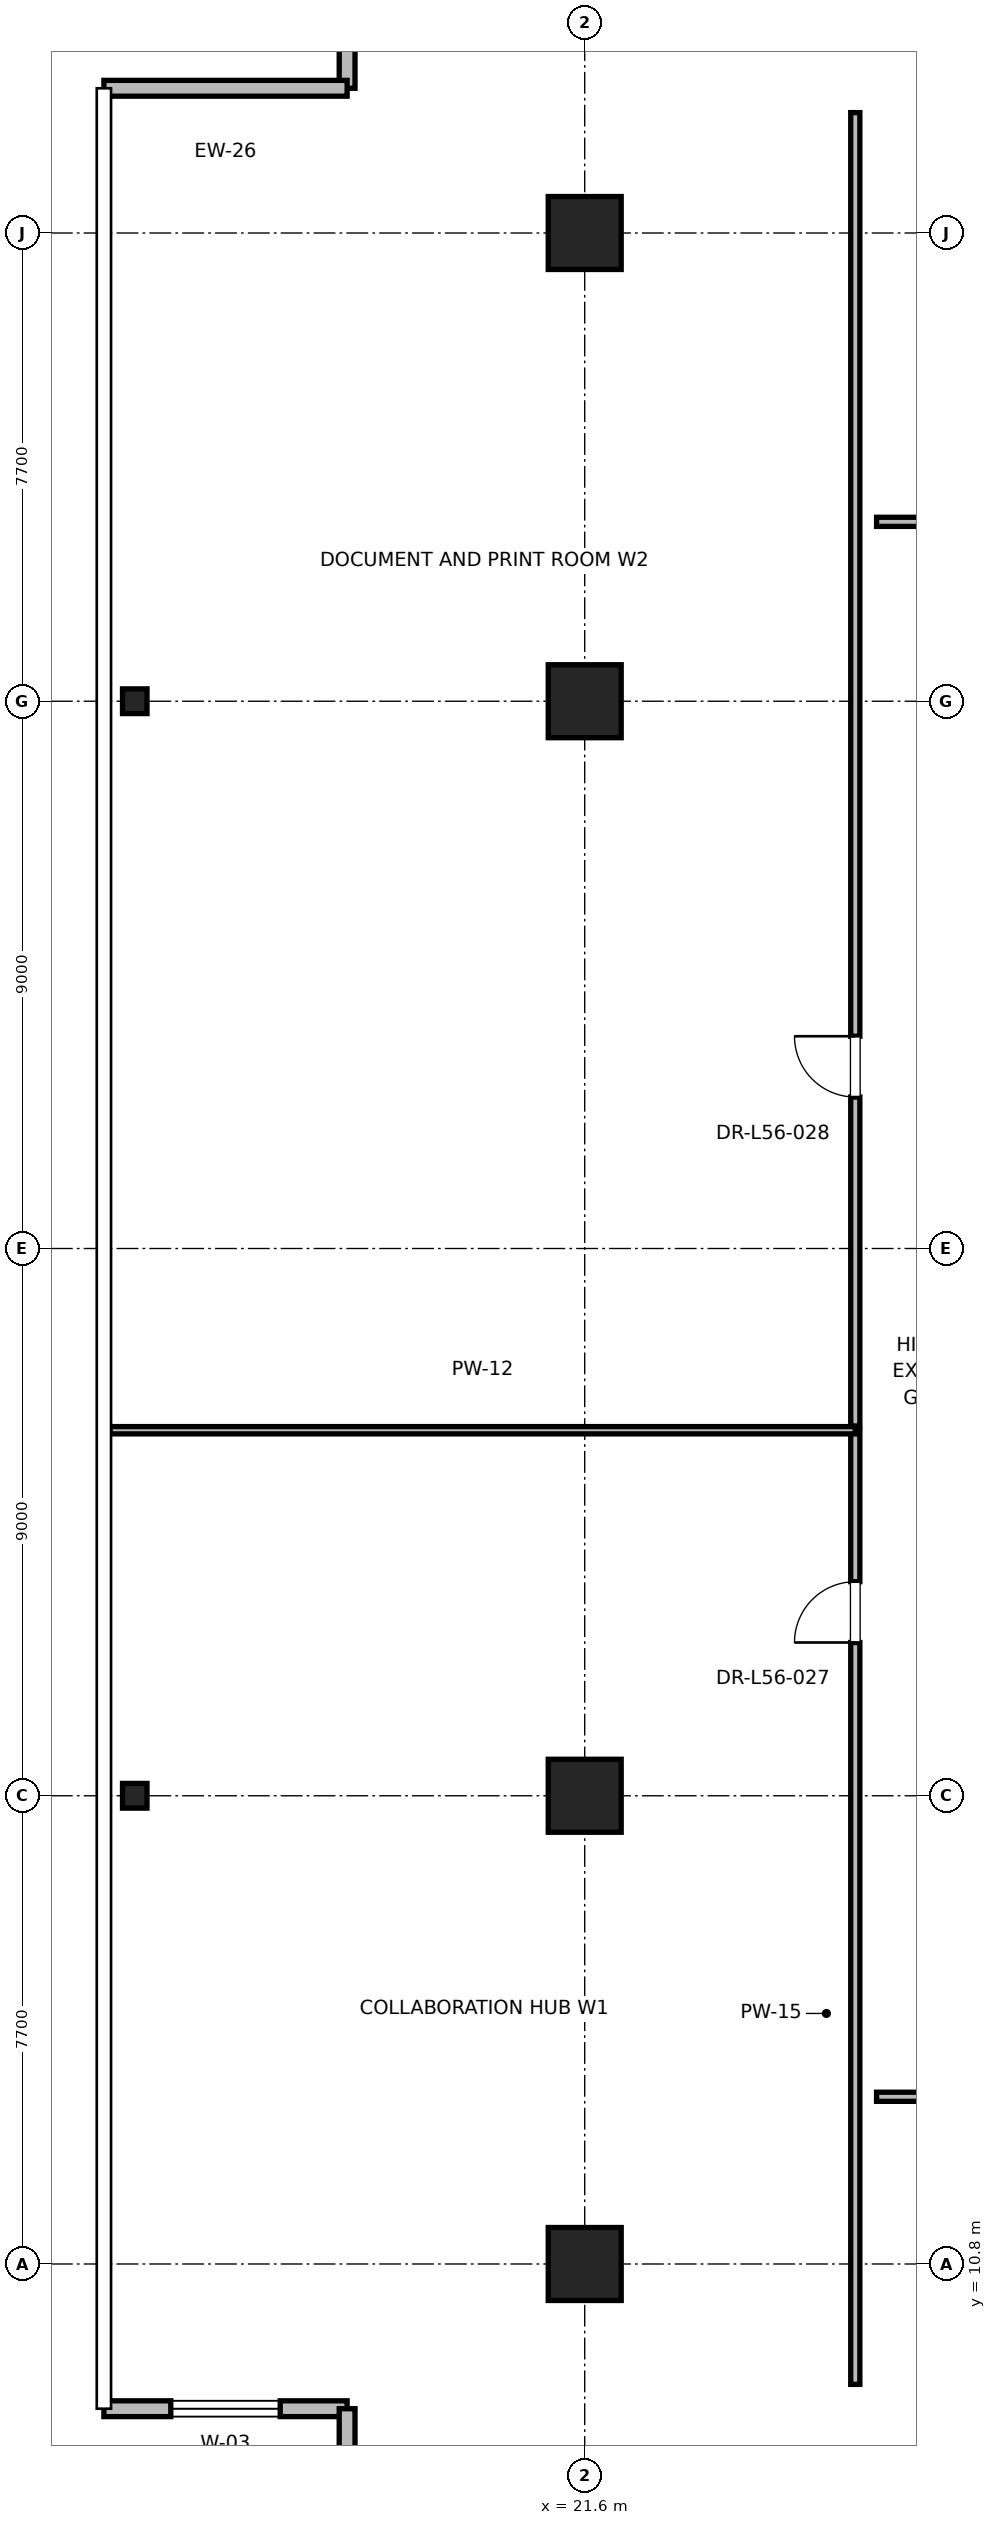
"""IFC4 building model, lengths in metres.
Left out: names, types, materials, properties, quantities, classifications, styles, units other than length and angle.
Written with IfcOpenShell. Run it as: python <this file> out.ifc"""

import sys

from ifc_helpers import new_model, si_unit, direction, frame, frame_2d, origin, origin_2d, place, context, subcontext, project, spatial, rectangle, i_section, extrude, element, fill, save


model = new_model("IFC4")
c1 = context("Model", 3, precision=1e-05, world=origin(), true_north=direction((0.0, 1.0)))
c2 = subcontext(c1, "Body", "Model", "MODEL_VIEW")
j1 = project(units=[si_unit("LENGTHUNIT", "METRE"), si_unit("PLANEANGLEUNIT", "RADIAN")], contexts=[c1])
p1 = place(None, origin())
s1 = spatial("IfcSite", under=j1, at=p1, CompositionType="ELEMENT")
p2 = place(p1, origin())
s2 = spatial("IfcBuilding", under=s1, at=p2, CompositionType="ELEMENT")
p3 = place(p2, frame((0.0, 0.0, 243.2)))
s3 = spatial("IfcBuildingStorey", under=s2, at=p3, CompositionType="ELEMENT", Elevation=243.2)
for number, where, z_axis, x_axis in (
    (1, (21.6, 18.5, 0.0), (0.0, 0.0, 1.0), (1.0, 0.0, 0.0)),
    (2, (21.6, 36.5, 0.0), (0.0, 0.0, 1.0), (1.0, 0.0, 0.0)),
    (3, (21.6, 10.8, 0.0), (0.0, 0.0, 1.0), (1.0, 0.0, 0.0)),
    (4, (21.6, 44.2, 0.0), (0.0, 0.0, 1.0), (1.0, 0.0, 0.0)),
):
    element("IfcColumn", number, at=place(p3, frame(where, z_axis=z_axis, x_axis=x_axis)), inside=s3, PredefinedType="COLUMN", context=c2, shape_type="SweptSolid", body=[
        extrude(rectangle(XDim=1.2, YDim=1.2, at=origin_2d()), origin(), (0.0, 0.0, 1.0), 4.0),
    ])
for number, where, z_axis, x_axis in (
    (5, (14.2, 18.5, 0.0), (0.0, 0.0, 1.0), (1.0, 0.0, 0.0)),
    (6, (14.2, 36.5, 0.0), (0.0, 0.0, 1.0), (1.0, 0.0, 0.0)),
):
    element("IfcColumn", number, at=place(p3, frame(where, z_axis=z_axis, x_axis=x_axis)), inside=s3, PredefinedType="COLUMN", context=c2, shape_type="SweptSolid", body=[
        extrude(i_section(OverallWidth=0.403, OverallDepth=0.406, WebThickness=0.027, FlangeThickness=0.043, FilletRadius=0.015, at=origin_2d()), origin(), (0.0, 0.0, 1.0), 4.0),
    ])
p4 = place(p3, frame((13.692, 8.42, 0.0), z_axis=(0.0, 0.0, 1.0), x_axis=(1.0, 0.0, 0.0)))
e7 = element("IfcWall", 7, at=p4, inside=s3, PredefinedType="PARAPET", context=c2, shape_type="SweptSolid", body=[
    extrude(rectangle(XDim=4.0, YDim=0.26, at=frame_2d((2.0, 0.0))), origin(), (0.0, 0.0, 1.0), 3.785),
])
p5 = place(p4, frame((1.1, 0.0, 0.85)))
e8 = element("IfcOpeningElement", 8, at=p5, cuts=e7, PredefinedType="OPENING", context=c2, shape_type="SweptSolid", body=[
    extrude(rectangle(XDim=1.8, YDim=2.2, at=frame_2d((0.9, 1.1))), frame((0.0, 0.13, 0.0), z_axis=(0.0, -1.0, 0.0), x_axis=(1.0, 0.0, 0.0)), (0.0, 0.0, 1.0), 0.26),
])
p6 = place(p3, frame((17.692, 8.42, 0.0), z_axis=(0.0, 0.0, 1.0), x_axis=(0.0, -1.0, 0.0)))
e9 = element("IfcWall", 9, at=p6, inside=s3, PredefinedType="PARAPET", context=c2, shape_type="SweptSolid", body=[
    extrude(rectangle(XDim=3.5, YDim=0.26, at=frame_2d((1.75, 0.0))), origin(), (0.0, 0.0, 1.0), 3.785),
])
p7 = place(p3, frame((17.692, 50.08, 0.0), z_axis=(0.0, 0.0, 1.0), x_axis=(0.0, -1.0, 0.0)))
e10 = element("IfcWall", 10, at=p7, inside=s3, PredefinedType="PARAPET", context=c2, shape_type="SweptSolid", body=[
    extrude(rectangle(XDim=3.5, YDim=0.26, at=frame_2d((1.75, 0.0))), origin(), (0.0, 0.0, 1.0), 3.785),
])
p8 = place(p7, frame((0.85, 0.0, 0.85)))
e11 = element("IfcOpeningElement", 11, at=p8, cuts=e10, PredefinedType="OPENING", context=c2, shape_type="SweptSolid", body=[
    extrude(rectangle(XDim=1.8, YDim=2.2, at=frame_2d((0.9, 1.1))), frame((0.0, 0.13, 0.0), z_axis=(0.0, -1.0, 0.0), x_axis=(1.0, 0.0, 0.0)), (0.0, 0.0, 1.0), 0.26),
])
p9 = place(p3, frame((17.692, 46.58, 0.0), z_axis=(0.0, 0.0, 1.0), x_axis=(-1.0, 0.0, 0.0)))
e12 = element("IfcWall", 12, at=p9, inside=s3, PredefinedType="PARAPET", context=c2, shape_type="SweptSolid", body=[
    extrude(rectangle(XDim=4.0, YDim=0.26, at=frame_2d((2.0, 0.0))), origin(), (0.0, 0.0, 1.0), 3.785),
])
p10 = place(p3, frame((26.4, 39.45, 0.0), z_axis=(0.0, 0.0, 1.0), x_axis=(1.0, 0.0, 0.0)))
e13 = element("IfcWall", 13, at=p10, inside=s3, PredefinedType="PARTITIONING", context=c2, shape_type="SweptSolid", body=[
    extrude(rectangle(XDim=14.96, YDim=0.15, at=frame_2d((7.48, 0.0))), origin(), (0.0, 0.0, 1.0), 2.85),
])
p11 = place(p10, frame((6.995, 0.0, 0.0)))
e14 = element("IfcOpeningElement", 14, at=p11, cuts=e13, PredefinedType="OPENING", context=c2, shape_type="SweptSolid", body=[
    extrude(rectangle(XDim=1.0, YDim=2.15, at=frame_2d((0.5, 1.075))), frame((0.0, 0.075, 0.0), z_axis=(0.0, -1.0, 0.0), x_axis=(1.0, 0.0, 0.0)), (0.0, 0.0, 1.0), 0.15),
])
p12 = place(p3, frame((26.4, 13.55, 0.0), z_axis=(0.0, 0.0, 1.0), x_axis=(1.0, 0.0, 0.0)))
e15 = element("IfcWall", 15, at=p12, inside=s3, PredefinedType="PARTITIONING", context=c2, shape_type="SweptSolid", body=[
    extrude(rectangle(XDim=27.2, YDim=0.15, at=frame_2d((13.6, 0.0))), origin(), (0.0, 0.0, 1.0), 2.85),
])
p13 = place(p12, frame((13.1, 0.0, 0.0)))
e16 = element("IfcOpeningElement", 16, at=p13, cuts=e15, PredefinedType="OPENING", context=c2, shape_type="SweptSolid", body=[
    extrude(rectangle(XDim=1.0, YDim=2.15, at=frame_2d((0.5, 1.075))), frame((0.0, 0.075, 0.0), z_axis=(0.0, -1.0, 0.0), x_axis=(1.0, 0.0, 0.0)), (0.0, 0.0, 1.0), 0.15),
])
p14 = place(p3, frame((26.05, 8.82, 0.0), z_axis=(0.0, 0.0, 1.0), x_axis=(0.0, 1.0, 0.0)))
e17 = element("IfcWall", 17, at=p14, inside=s3, PredefinedType="PARTITIONING", context=c2, shape_type="SweptSolid", body=[
    extrude(rectangle(XDim=15.691, YDim=0.15, at=frame_2d((7.846, 0.0))), origin(), (0.0, 0.0, 1.0), 2.85),
])
p15 = place(p14, frame((12.201, 0.0, 0.0)))
e18 = element("IfcOpeningElement", 18, at=p15, cuts=e17, PredefinedType="OPENING", context=c2, shape_type="SweptSolid", body=[
    extrude(rectangle(XDim=1.0, YDim=2.15, at=frame_2d((0.5, 1.075))), frame((0.0, 0.075, 0.0), z_axis=(0.0, -1.0, 0.0), x_axis=(1.0, 0.0, 0.0)), (0.0, 0.0, 1.0), 0.15),
])
p16 = place(p3, frame((13.792, 24.511, 0.0), z_axis=(0.0, 0.0, 1.0), x_axis=(1.0, 0.0, 0.0)))
e19 = element("IfcWall", 19, at=p16, inside=s3, PredefinedType="PARTITIONING", context=c2, shape_type="SweptSolid", body=[
    extrude(rectangle(XDim=12.258, YDim=0.12, at=frame_2d((6.129, 0.0))), origin(), (0.0, 0.0, 1.0), 2.85),
])
p17 = place(p3, frame((26.05, 24.581, 0.0), z_axis=(0.0, 0.0, 1.0), x_axis=(0.0, 1.0, 0.0)))
e20 = element("IfcWall", 20, at=p17, inside=s3, PredefinedType="PARTITIONING", context=c2, shape_type="SweptSolid", body=[
    extrude(rectangle(XDim=21.599, YDim=0.15, at=frame_2d((10.799, 0.0))), origin(), (0.0, 0.0, 1.0), 2.85),
])
p18 = place(p17, frame((5.409, 0.0, 0.0)))
e21 = element("IfcOpeningElement", 21, at=p18, cuts=e20, PredefinedType="OPENING", context=c2, shape_type="SweptSolid", body=[
    extrude(rectangle(XDim=1.0, YDim=2.15, at=frame_2d((0.5, 1.075))), frame((0.0, 0.075, 0.0), z_axis=(0.0, -1.0, 0.0), x_axis=(1.0, 0.0, 0.0)), (0.0, 0.0, 1.0), 0.15),
])
p19 = place(p5, origin())
e22 = element("IfcWindow", 22, at=p19, inside=s3, PartitioningType="SINGLE_PANEL", PredefinedType="WINDOW", context=c2, shape_type="SweptSolid", body=[
    extrude(rectangle(XDim=1.8, YDim=2.2, at=frame_2d((0.9, 1.1))), frame((0.0, 0.03, 0.0), z_axis=(0.0, -1.0, 0.0), x_axis=(1.0, 0.0, 0.0)), (0.0, 0.0, 1.0), 0.06),
])
fill(e8, e22)
p20 = place(p15, origin())
e23 = element("IfcDoor", 23, at=p20, inside=s3, OperationType="SINGLE_SWING_LEFT", PredefinedType="DOOR", context=c2, shape_type="SweptSolid", body=[
    extrude(rectangle(XDim=1.0, YDim=2.15, at=frame_2d((0.5, 1.075))), frame((0.0, 0.025, 0.0), z_axis=(0.0, -1.0, 0.0), x_axis=(1.0, 0.0, 0.0)), (0.0, 0.0, 1.0), 0.05),
])
fill(e18, e23)
p21 = place(p18, origin())
e24 = element("IfcDoor", 24, at=p21, inside=s3, OperationType="SINGLE_SWING_RIGHT", PredefinedType="DOOR", context=c2, shape_type="SweptSolid", body=[
    extrude(rectangle(XDim=1.0, YDim=2.15, at=frame_2d((0.5, 1.075))), frame((0.0, 0.025, 0.0), z_axis=(0.0, -1.0, 0.0), x_axis=(1.0, 0.0, 0.0)), (0.0, 0.0, 1.0), 0.05),
])
fill(e21, e24)
save(model, sys.argv[1])
